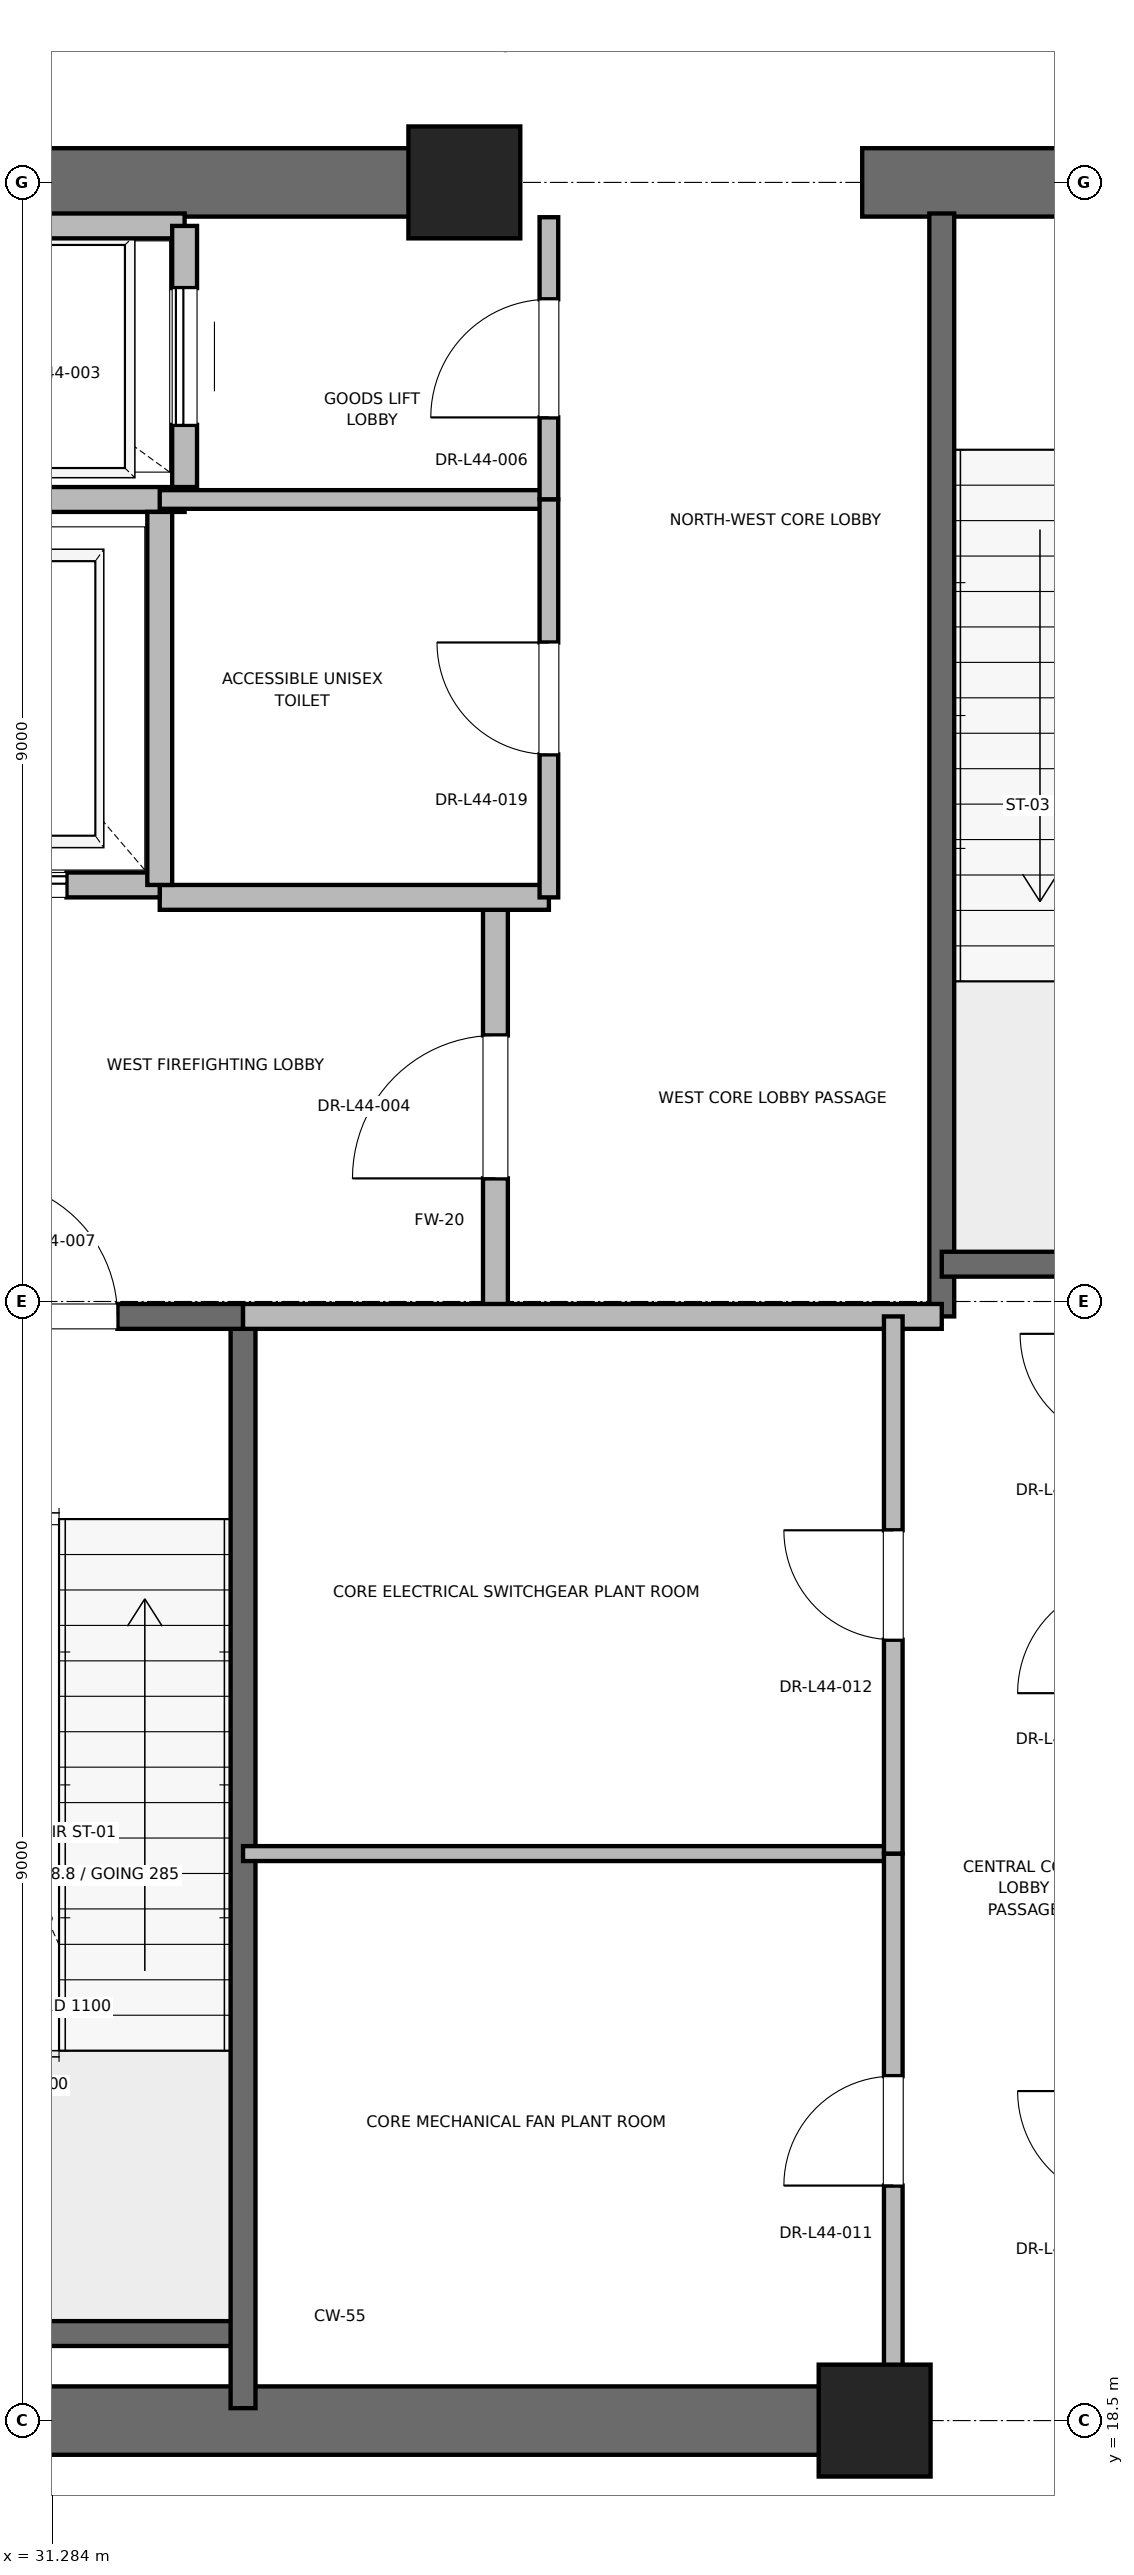
"""IFC4 building model, lengths in metres.
Left out: names, types, materials, properties, quantities, classifications, styles, units other than length and angle.
Written with IfcOpenShell. Run it as: python <this file> out.ifc"""

import sys

from ifc_helpers import new_model, si_unit, direction, frame, frame_2d, origin, origin_2d, place, context, subcontext, project, spatial, rectangle, extrude, element, fill, save


model = new_model("IFC4")
c1 = context("Model", 3, precision=1e-05, world=origin(), true_north=direction((0.0, 1.0)))
c2 = subcontext(c1, "Body", "Model", "MODEL_VIEW")
j1 = project(units=[si_unit("LENGTHUNIT", "METRE"), si_unit("PLANEANGLEUNIT", "RADIAN")], contexts=[c1])
p1 = place(None, origin())
s1 = spatial("IfcSite", under=j1, at=p1, CompositionType="ELEMENT")
p2 = place(p1, origin())
s2 = spatial("IfcBuilding", under=s1, at=p2, CompositionType="ELEMENT")
p3 = place(p2, frame((0.0, 0.0, 189.4)))
s3 = spatial("IfcBuildingStorey", under=s2, at=p3, CompositionType="ELEMENT", Elevation=189.4)
for number, where, z_axis, x_axis in (
    (1, (37.9, 18.5, 0.0), (0.0, 0.0, 1.0), (1.0, 0.0, 0.0)),
    (2, (34.6, 36.5, 0.0), (0.0, 0.0, 1.0), (1.0, 0.0, 0.0)),
):
    element("IfcColumn", number, at=place(p3, frame(where, z_axis=z_axis, x_axis=x_axis)), inside=s3, PredefinedType="PILASTER", context=c2, shape_type="SweptSolid", body=[
        extrude(rectangle(XDim=0.9, YDim=0.9, at=origin_2d()), origin(), (0.0, 0.0, 1.0), 5.4),
    ])
p4 = place(p3, frame((29.0, 18.5, 0.0), z_axis=(0.0, 0.0, 1.0), x_axis=(1.0, 0.0, 0.0)))
e3 = element("IfcWall", 3, at=p4, inside=s3, PredefinedType="SHEAR", context=c2, shape_type="SweptSolid", body=[
    extrude(rectangle(XDim=9.2, YDim=0.55, at=frame_2d((4.6, 0.0))), origin(), (0.0, 0.0, 1.0), 5.1),
])
p5 = place(p3, frame((29.0, 36.5, 0.0), z_axis=(0.0, 0.0, 1.0), x_axis=(1.0, 0.0, 0.0)))
e4 = element("IfcWall", 4, at=p5, inside=s3, PredefinedType="SHEAR", context=c2, shape_type="SweptSolid", body=[
    extrude(rectangle(XDim=5.8, YDim=0.55, at=frame_2d((2.9, 0.0))), origin(), (0.0, 0.0, 1.0), 5.1),
])
p6 = place(p3, frame((37.8, 36.5, 0.0), z_axis=(0.0, 0.0, 1.0), x_axis=(1.0, 0.0, 0.0)))
e5 = element("IfcWall", 5, at=p6, inside=s3, PredefinedType="SHEAR", context=c2, shape_type="SweptSolid", body=[
    extrude(rectangle(XDim=4.4, YDim=0.55, at=frame_2d((2.2, 0.0))), origin(), (0.0, 0.0, 1.0), 5.1),
])
p7 = place(p6, frame((1.65, 0.0, 0.0)))
e6 = element("IfcOpeningElement", 6, at=p7, cuts=e5, PredefinedType="OPENING", context=c2, shape_type="SweptSolid", body=[
    extrude(rectangle(XDim=1.1, YDim=2.15, at=frame_2d((0.55, 1.075))), frame((0.0, 0.275, 0.0), z_axis=(0.0, -1.0, 0.0), x_axis=(1.0, 0.0, 0.0)), (0.0, 0.0, 1.0), 0.55),
])
p8 = place(p3, frame((29.7, 19.2, 0.0), z_axis=(0.0, 0.0, 1.0), x_axis=(1.0, 0.0, 0.0)))
e7 = element("IfcWall", 7, at=p8, inside=s3, PredefinedType="SOLIDWALL", context=c2, shape_type="SweptSolid", body=[
    extrude(rectangle(XDim=3.12, YDim=0.2, at=frame_2d((1.56, 0.0))), origin(), (0.0, 0.0, 1.0), 5.1),
])
p9 = place(p3, frame((32.82, 18.6, 0.0), z_axis=(0.0, 0.0, 1.0), x_axis=(0.0, 1.0, 0.0)))
e8 = element("IfcWall", 8, at=p9, inside=s3, PredefinedType="SOLIDWALL", context=c2, shape_type="SweptSolid", body=[
    extrude(rectangle(XDim=8.78, YDim=0.2, at=frame_2d((4.39, 0.0))), origin(), (0.0, 0.0, 1.0), 5.1),
])
p10 = place(p3, frame((29.7, 27.38, 0.0), z_axis=(0.0, 0.0, 1.0), x_axis=(1.0, 0.0, 0.0)))
e9 = element("IfcWall", 9, at=p10, inside=s3, PredefinedType="SOLIDWALL", context=c2, shape_type="SweptSolid", body=[
    extrude(rectangle(XDim=3.12, YDim=0.2, at=frame_2d((1.56, 0.0))), origin(), (0.0, 0.0, 1.0), 5.1),
])
p11 = place(p10, frame((1.01, 0.0, 0.0)))
e10 = element("IfcOpeningElement", 10, at=p11, cuts=e9, PredefinedType="OPENING", context=c2, shape_type="SweptSolid", body=[
    extrude(rectangle(XDim=1.1, YDim=2.15, at=frame_2d((0.55, 1.075))), frame((0.0, 0.1, 0.0), z_axis=(0.0, -1.0, 0.0), x_axis=(1.0, 0.0, 0.0)), (0.0, 0.0, 1.0), 0.2),
])
p12 = place(p3, frame((38.44, 27.38, 0.0), z_axis=(0.0, 0.0, 1.0), x_axis=(0.0, 1.0, 0.0)))
e11 = element("IfcWall", 11, at=p12, inside=s3, PredefinedType="SOLIDWALL", context=c2, shape_type="SweptSolid", body=[
    extrude(rectangle(XDim=8.87, YDim=0.2, at=frame_2d((4.435, 0.0))), origin(), (0.0, 0.0, 1.0), 5.1),
])
p13 = place(p3, frame((38.44, 27.8, 0.0), z_axis=(0.0, 0.0, 1.0), x_axis=(1.0, 0.0, 0.0)))
e12 = element("IfcWall", 12, at=p13, inside=s3, PredefinedType="SOLIDWALL", context=c2, shape_type="SweptSolid", body=[
    extrude(rectangle(XDim=3.32, YDim=0.2, at=frame_2d((1.66, 0.0))), origin(), (0.0, 0.0, 1.0), 5.1),
])
p14 = place(p3, frame((34.85, 27.38, 0.0), z_axis=(0.0, 0.0, 1.0), x_axis=(0.0, 1.0, 0.0)))
e13 = element("IfcWall", 13, at=p14, inside=s3, PredefinedType="PARTITIONING", context=c2, shape_type="SweptSolid", body=[
    extrude(rectangle(XDim=3.37, YDim=0.2, at=frame_2d((1.685, 0.0))), origin(), (0.0, 0.0, 1.0), 5.1),
])
p15 = place(p14, frame((1.11, 0.0, 0.0)))
e14 = element("IfcOpeningElement", 14, at=p15, cuts=e13, PredefinedType="OPENING", context=c2, shape_type="SweptSolid", body=[
    extrude(rectangle(XDim=1.15, YDim=2.2, at=frame_2d((0.575, 1.1))), frame((0.0, 0.1, 0.0), z_axis=(0.0, -1.0, 0.0), x_axis=(1.0, 0.0, 0.0)), (0.0, 0.0, 1.0), 0.2),
])
p16 = place(p3, frame((32.82, 27.38, 0.0), z_axis=(0.0, 0.0, 1.0), x_axis=(1.0, 0.0, 0.0)))
e15 = element("IfcWall", 15, at=p16, inside=s3, PredefinedType="PARTITIONING", context=c2, shape_type="SweptSolid", body=[
    extrude(rectangle(XDim=5.62, YDim=0.2, at=frame_2d((2.81, 0.0))), origin(), (0.0, 0.0, 1.0), 5.1),
])
p17 = place(p3, frame((32.15, 30.75, 0.0), z_axis=(0.0, 0.0, 1.0), x_axis=(1.0, 0.0, 0.0)))
e16 = element("IfcWall", 16, at=p17, inside=s3, PredefinedType="PARTITIONING", context=c2, shape_type="SweptSolid", body=[
    extrude(rectangle(XDim=3.13, YDim=0.2, at=frame_2d((1.565, 0.0))), origin(), (0.0, 0.0, 1.0), 5.1),
])
p18 = place(p3, frame((29.55, 30.85, 0.0), z_axis=(0.0, 0.0, 1.0), x_axis=(1.0, 0.0, 0.0)))
e17 = element("IfcWall", 17, at=p18, inside=s3, PredefinedType="SOLIDWALL", context=c2, shape_type="SweptSolid", body=[
    extrude(rectangle(XDim=2.6, YDim=0.2, at=frame_2d((1.3, 0.0))), origin(), (0.0, 0.0, 1.0), 4.08),
])
p19 = place(p18, frame((0.75, 0.0, 0.0)))
e18 = element("IfcOpeningElement", 18, at=p19, cuts=e17, PredefinedType="OPENING", context=c2, shape_type="SweptSolid", body=[
    extrude(rectangle(XDim=1.1, YDim=2.2, at=frame_2d((0.55, 1.1))), frame((0.0, 0.1, 0.0), z_axis=(0.0, -1.0, 0.0), x_axis=(1.0, 0.0, 0.0)), (0.0, 0.0, 1.0), 0.2),
])
p20 = place(p3, frame((29.55, 33.95, 0.0), z_axis=(0.0, 0.0, 1.0), x_axis=(1.0, 0.0, 0.0)))
e19 = element("IfcWall", 19, at=p20, inside=s3, PredefinedType="SOLIDWALL", context=c2, shape_type="SweptSolid", body=[
    extrude(rectangle(XDim=2.8, YDim=0.2, at=frame_2d((1.4, 0.0))), origin(), (0.0, 0.0, 1.0), 5.1),
])
p21 = place(p3, frame((32.15, 30.85, 0.0), z_axis=(0.0, 0.0, 1.0), x_axis=(0.0, 1.0, 0.0)))
e20 = element("IfcWall", 20, at=p21, inside=s3, PredefinedType="SOLIDWALL", context=c2, shape_type="SweptSolid", body=[
    extrude(rectangle(XDim=3.0, YDim=0.2, at=frame_2d((1.5, 0.0))), origin(), (0.0, 0.0, 1.0), 5.1),
])
p22 = place(p3, frame((32.35, 36.15, 0.0), z_axis=(0.0, 0.0, 1.0), x_axis=(-1.0, 0.0, 0.0)))
e21 = element("IfcWall", 21, at=p22, inside=s3, PredefinedType="SOLIDWALL", context=c2, shape_type="SweptSolid", body=[
    extrude(rectangle(XDim=2.8, YDim=0.2, at=frame_2d((1.4, 0.0))), origin(), (0.0, 0.0, 1.0), 4.154),
])
p23 = place(p3, frame((32.35, 34.05, 0.0), z_axis=(0.0, 0.0, 1.0), x_axis=(0.0, 1.0, 0.0)))
e22 = element("IfcWall", 22, at=p23, inside=s3, PredefinedType="SOLIDWALL", context=c2, shape_type="SweptSolid", body=[
    extrude(rectangle(XDim=2.1, YDim=0.2, at=frame_2d((1.05, 0.0))), origin(), (0.0, 0.0, 1.0), 5.1),
])
p24 = place(p23, frame((0.5, 0.0, 0.0)))
e23 = element("IfcOpeningElement", 23, at=p24, cuts=e22, PredefinedType="OPENING", context=c2, shape_type="SweptSolid", body=[
    extrude(rectangle(XDim=1.1, YDim=2.2, at=frame_2d((0.55, 1.1))), frame((0.0, 0.1, 0.0), z_axis=(0.0, -1.0, 0.0), x_axis=(1.0, 0.0, 0.0)), (0.0, 0.0, 1.0), 0.2),
])
p25 = place(p3, frame((32.15, 33.95, 0.0), z_axis=(0.0, 0.0, 1.0), x_axis=(1.0, 0.0, 0.0)))
e24 = element("IfcWall", 24, at=p25, inside=s3, PredefinedType="PARTITIONING", context=c2, shape_type="SweptSolid", body=[
    extrude(rectangle(XDim=3.13, YDim=0.15, at=frame_2d((1.565, 0.0))), origin(), (0.0, 0.0, 1.0), 2.85),
])
p26 = place(p3, frame((35.28, 33.95, 0.0), z_axis=(0.0, 0.0, 1.0), x_axis=(0.0, 1.0, 0.0)))
e25 = element("IfcWall", 25, at=p26, inside=s3, PredefinedType="PARTITIONING", context=c2, shape_type="SweptSolid", body=[
    extrude(rectangle(XDim=2.27, YDim=0.15, at=frame_2d((1.135, 0.0))), origin(), (0.0, 0.0, 1.0), 2.85),
])
p27 = place(p26, frame((0.66, 0.0, 0.0)))
e26 = element("IfcOpeningElement", 26, at=p27, cuts=e25, PredefinedType="OPENING", context=c2, shape_type="SweptSolid", body=[
    extrude(rectangle(XDim=0.95, YDim=2.15, at=frame_2d((0.475, 1.075))), frame((0.0, 0.075, 0.0), z_axis=(0.0, -1.0, 0.0), x_axis=(1.0, 0.0, 0.0)), (0.0, 0.0, 1.0), 0.15),
])
p28 = place(p3, frame((35.28, 30.75, 0.0), z_axis=(0.0, 0.0, 1.0), x_axis=(0.0, 1.0, 0.0)))
e27 = element("IfcWall", 27, at=p28, inside=s3, PredefinedType="PARTITIONING", context=c2, shape_type="SweptSolid", body=[
    extrude(rectangle(XDim=3.2, YDim=0.15, at=frame_2d((1.6, 0.0))), origin(), (0.0, 0.0, 1.0), 2.85),
])
p29 = place(p28, frame((1.15, 0.0, 0.0)))
e28 = element("IfcOpeningElement", 28, at=p29, cuts=e27, PredefinedType="OPENING", context=c2, shape_type="SweptSolid", body=[
    extrude(rectangle(XDim=0.9, YDim=2.1, at=frame_2d((0.45, 1.05))), frame((0.0, 0.075, 0.0), z_axis=(0.0, -1.0, 0.0), x_axis=(1.0, 0.0, 0.0)), (0.0, 0.0, 1.0), 0.15),
])
p30 = place(p3, frame((32.82, 23.06, 0.0), z_axis=(0.0, 0.0, 1.0), x_axis=(1.0, 0.0, 0.0)))
e29 = element("IfcWall", 29, at=p30, inside=s3, PredefinedType="PARTITIONING", context=c2, shape_type="SweptSolid", body=[
    extrude(rectangle(XDim=5.23, YDim=0.12, at=frame_2d((2.615, 0.0))), origin(), (0.0, 0.0, 1.0), 2.85),
])
p31 = place(p3, frame((38.05, 18.6, 0.0), z_axis=(0.0, 0.0, 1.0), x_axis=(0.0, 1.0, 0.0)))
e30 = element("IfcWall", 30, at=p31, inside=s3, PredefinedType="PARTITIONING", context=c2, shape_type="SweptSolid", body=[
    extrude(rectangle(XDim=4.46, YDim=0.15, at=frame_2d((2.23, 0.0))), origin(), (0.0, 0.0, 1.0), 2.85),
])
p32 = place(p31, frame((1.79, 0.0, 0.0)))
e31 = element("IfcOpeningElement", 31, at=p32, cuts=e30, PredefinedType="OPENING", context=c2, shape_type="SweptSolid", body=[
    extrude(rectangle(XDim=0.88, YDim=2.1, at=frame_2d((0.44, 1.05))), frame((0.0, 0.075, 0.0), z_axis=(0.0, -1.0, 0.0), x_axis=(1.0, 0.0, 0.0)), (0.0, 0.0, 1.0), 0.15),
])
p33 = place(p3, frame((38.05, 23.06, 0.0), z_axis=(0.0, 0.0, 1.0), x_axis=(0.0, 1.0, 0.0)))
e32 = element("IfcWall", 32, at=p33, inside=s3, PredefinedType="PARTITIONING", context=c2, shape_type="SweptSolid", body=[
    extrude(rectangle(XDim=4.32, YDim=0.15, at=frame_2d((2.16, 0.0))), origin(), (0.0, 0.0, 1.0), 2.85),
])
p34 = place(p33, frame((1.72, 0.0, 0.0)))
e33 = element("IfcOpeningElement", 33, at=p34, cuts=e32, PredefinedType="OPENING", context=c2, shape_type="SweptSolid", body=[
    extrude(rectangle(XDim=0.88, YDim=2.1, at=frame_2d((0.44, 1.05))), frame((0.0, 0.075, 0.0), z_axis=(0.0, -1.0, 0.0), x_axis=(1.0, 0.0, 0.0)), (0.0, 0.0, 1.0), 0.15),
])
p35 = place(p11, origin())
e34 = element("IfcDoor", 34, at=p35, inside=s3, OperationType="SINGLE_SWING_LEFT", PredefinedType="DOOR", context=c2, shape_type="SweptSolid", body=[
    extrude(rectangle(XDim=1.1, YDim=2.15, at=frame_2d((0.55, 1.075))), frame((0.0, 0.025, 0.0), z_axis=(0.0, -1.0, 0.0), x_axis=(1.0, 0.0, 0.0)), (0.0, 0.0, 1.0), 0.05),
])
fill(e10, e34)
p36 = place(p15, origin())
e35 = element("IfcDoor", 35, at=p36, inside=s3, OperationType="SINGLE_SWING_LEFT", PredefinedType="DOOR", context=c2, shape_type="SweptSolid", body=[
    extrude(rectangle(XDim=1.15, YDim=2.2, at=frame_2d((0.575, 1.1))), frame((0.0, 0.025, 0.0), z_axis=(0.0, -1.0, 0.0), x_axis=(1.0, 0.0, 0.0)), (0.0, 0.0, 1.0), 0.05),
])
fill(e14, e35)
p37 = place(p19, origin())
e36 = element("IfcDoor", 36, at=p37, inside=s3, OperationType="SLIDING_TO_RIGHT", PredefinedType="DOOR", context=c2, shape_type="SweptSolid", body=[
    extrude(rectangle(XDim=1.1, YDim=2.2, at=frame_2d((0.55, 1.1))), frame((0.0, 0.025, 0.0), z_axis=(0.0, -1.0, 0.0), x_axis=(1.0, 0.0, 0.0)), (0.0, 0.0, 1.0), 0.05),
])
fill(e18, e36)
p38 = place(p24, origin())
e37 = element("IfcDoor", 37, at=p38, inside=s3, OperationType="SLIDING_TO_RIGHT", PredefinedType="DOOR", context=c2, shape_type="SweptSolid", body=[
    extrude(rectangle(XDim=1.1, YDim=2.2, at=frame_2d((0.55, 1.1))), frame((0.0, 0.025, 0.0), z_axis=(0.0, -1.0, 0.0), x_axis=(1.0, 0.0, 0.0)), (0.0, 0.0, 1.0), 0.05),
])
fill(e23, e37)
p39 = place(p27, origin())
e38 = element("IfcDoor", 38, at=p39, inside=s3, OperationType="SINGLE_SWING_LEFT", PredefinedType="DOOR", context=c2, shape_type="SweptSolid", body=[
    extrude(rectangle(XDim=0.95, YDim=2.15, at=frame_2d((0.475, 1.075))), frame((0.0, 0.025, 0.0), z_axis=(0.0, -1.0, 0.0), x_axis=(1.0, 0.0, 0.0)), (0.0, 0.0, 1.0), 0.05),
])
fill(e26, e38)
p40 = place(p29, origin())
e39 = element("IfcDoor", 39, at=p40, inside=s3, OperationType="SINGLE_SWING_RIGHT", PredefinedType="DOOR", context=c2, shape_type="SweptSolid", body=[
    extrude(rectangle(XDim=0.9, YDim=2.1, at=frame_2d((0.45, 1.05))), frame((0.0, 0.025, 0.0), z_axis=(0.0, -1.0, 0.0), x_axis=(1.0, 0.0, 0.0)), (0.0, 0.0, 1.0), 0.05),
])
fill(e28, e39)
p41 = place(p32, origin())
e40 = element("IfcDoor", 40, at=p41, inside=s3, OperationType="SINGLE_SWING_LEFT", PredefinedType="DOOR", context=c2, shape_type="SweptSolid", body=[
    extrude(rectangle(XDim=0.88, YDim=2.1, at=frame_2d((0.44, 1.05))), frame((0.0, 0.025, 0.0), z_axis=(0.0, -1.0, 0.0), x_axis=(1.0, 0.0, 0.0)), (0.0, 0.0, 1.0), 0.05),
])
fill(e31, e40)
p42 = place(p34, origin())
e41 = element("IfcDoor", 41, at=p42, inside=s3, OperationType="SINGLE_SWING_RIGHT", PredefinedType="DOOR", context=c2, shape_type="SweptSolid", body=[
    extrude(rectangle(XDim=0.88, YDim=2.1, at=frame_2d((0.44, 1.05))), frame((0.0, 0.025, 0.0), z_axis=(0.0, -1.0, 0.0), x_axis=(1.0, 0.0, 0.0)), (0.0, 0.0, 1.0), 0.05),
])
fill(e33, e41)
save(model, sys.argv[1])
